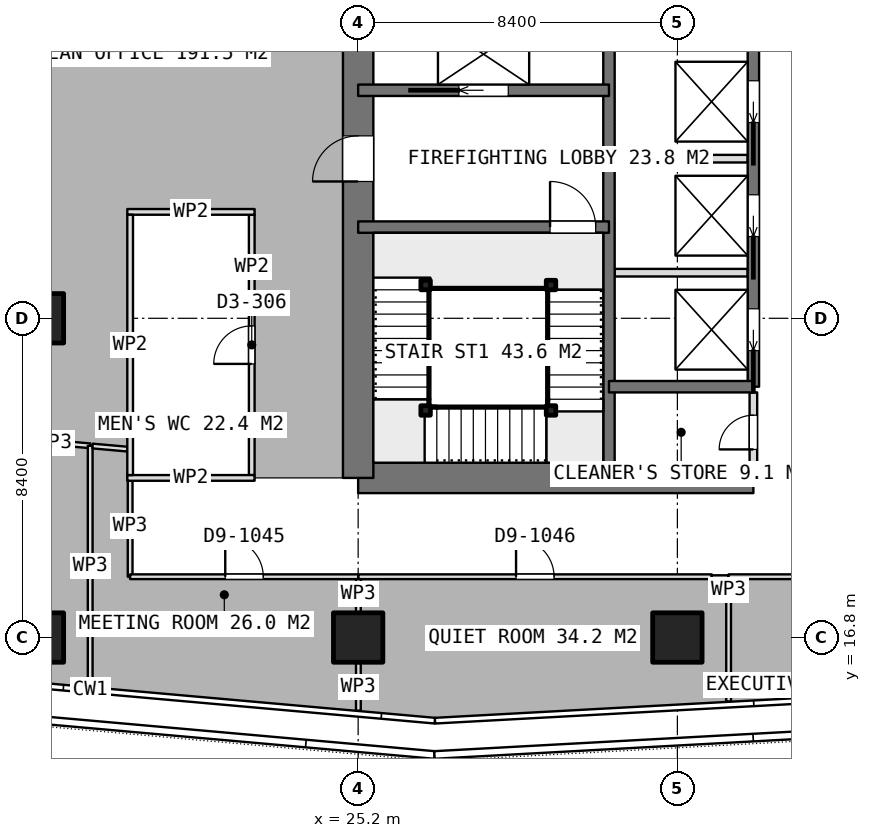
"""IFC4 building model, lengths in metres.
Left out: names, types, materials, properties, quantities, classifications, styles, units other than length and angle.
Written with IfcOpenShell. Run it as: python <this file> out.ifc"""

import sys

from ifc_helpers import new_model, si_unit, direction, frame, frame_2d, origin, origin_2d, place, context, subcontext, project, spatial, rectangle, extrude, element, fill, save


model = new_model("IFC4")
c1 = context("Model", 3, precision=1e-05, world=origin(), true_north=direction((0.0, 1.0)))
c2 = subcontext(c1, "Body", "Model", "MODEL_VIEW")
j1 = project(units=[si_unit("LENGTHUNIT", "METRE"), si_unit("PLANEANGLEUNIT", "RADIAN")], contexts=[c1])
p1 = place(None, origin())
s1 = spatial("IfcSite", under=j1, at=p1, CompositionType="ELEMENT")
p2 = place(p1, origin())
s2 = spatial("IfcBuilding", under=s1, at=p2, CompositionType="ELEMENT")
p3 = place(p2, frame((0.0, 0.0, 283.85)))
s3 = spatial("IfcBuildingStorey", under=s2, at=p3, CompositionType="ELEMENT", Elevation=283.85)
p4 = place(p3, frame((25.2, 21.0, 0.0), z_axis=(0.0, 0.0, 1.0), x_axis=(1.0, 0.0, 0.0)))
e1 = element("IfcWall", 1, at=p4, inside=s3, PredefinedType="SHEAR", context=c2, shape_type="SweptSolid", body=[
    extrude(rectangle(XDim=10.4, YDim=0.8, at=frame_2d((5.2, 0.0))), origin(), (0.0, 0.0, 1.0), 3.75),
])
p5 = place(p3, frame((25.2, 21.0, 0.0), z_axis=(0.0, 0.0, 1.0), x_axis=(0.0, 1.0, 0.0)))
e2 = element("IfcWall", 2, at=p5, inside=s3, PredefinedType="SHEAR", context=c2, shape_type="SweptSolid", body=[
    extrude(rectangle(XDim=25.2, YDim=0.8, at=frame_2d((12.6, 0.0))), origin(), (0.0, 0.0, 1.0), 3.75),
])
p6 = place(p5, frame((7.8, 0.0, 0.0)))
e3 = element("IfcOpeningElement", 3, at=p6, cuts=e2, PredefinedType="OPENING", context=c2, shape_type="SweptSolid", body=[
    extrude(rectangle(XDim=1.2, YDim=2.1, at=frame_2d((0.6, 1.05))), frame((0.0, 0.41, 0.0), z_axis=(0.0, -1.0, 0.0), x_axis=(1.0, 0.0, 0.0)), (0.0, 0.0, 1.0), 0.82),
])
p7 = place(p5, frame((14.25, 0.0, 0.0)))
e4 = element("IfcOpeningElement", 4, at=p7, cuts=e2, PredefinedType="OPENING", context=c2, shape_type="SweptSolid", body=[
    extrude(rectangle(XDim=0.9, YDim=2.1, at=frame_2d((0.45, 1.05))), frame((0.0, 0.41, 0.0), z_axis=(0.0, -1.0, 0.0), x_axis=(1.0, 0.0, 0.0)), (0.0, 0.0, 1.0), 0.82),
])
p8 = place(p5, frame((16.85, 0.0, 0.0)))
e5 = element("IfcOpeningElement", 5, at=p8, cuts=e2, PredefinedType="OPENING", context=c2, shape_type="SweptSolid", body=[
    extrude(rectangle(XDim=0.9, YDim=2.1, at=frame_2d((0.45, 1.05))), frame((0.0, 0.41, 0.0), z_axis=(0.0, -1.0, 0.0), x_axis=(1.0, 0.0, 0.0)), (0.0, 0.0, 1.0), 0.82),
])
p9 = place(p5, frame((18.95, 0.0, 0.0)))
e6 = element("IfcOpeningElement", 6, at=p9, cuts=e2, PredefinedType="OPENING", context=c2, shape_type="SweptSolid", body=[
    extrude(rectangle(XDim=1.2, YDim=2.1, at=frame_2d((0.6, 1.05))), frame((0.0, 0.41, 0.0), z_axis=(0.0, -1.0, 0.0), x_axis=(1.0, 0.0, 0.0)), (0.0, 0.0, 1.0), 0.82),
])
p10 = place(p3, frame((31.8, 21.0, 0.0), z_axis=(0.0, 0.0, 1.0), x_axis=(0.0, 1.0, 0.0)))
e7 = element("IfcWall", 7, at=p10, inside=s3, PredefinedType="SHEAR", context=c2, shape_type="SweptSolid", body=[
    extrude(rectangle(XDim=25.2, YDim=0.3, at=frame_2d((12.6, 0.0))), origin(), (0.0, 0.0, 1.0), 3.75),
])
p11 = place(p3, frame((35.6, 23.4, 0.0), z_axis=(0.0, 0.0, 1.0), x_axis=(0.0, 1.0, 0.0)))
e8 = element("IfcWall", 8, at=p11, inside=s3, PredefinedType="SHEAR", context=c2, shape_type="SweptSolid", body=[
    extrude(rectangle(XDim=18.0, YDim=0.3, at=frame_2d((9.0, 0.0))), origin(), (0.0, 0.0, 1.0), 3.75),
])
p12 = place(p11, frame((0.95, 0.0, 0.0)))
e9 = element("IfcOpeningElement", 9, at=p12, cuts=e8, PredefinedType="OPENING", context=c2, shape_type="SweptSolid", body=[
    extrude(rectangle(XDim=1.1, YDim=2.1, at=frame_2d((0.55, 1.05))), frame((0.0, 0.16, 0.0), z_axis=(0.0, -1.0, 0.0), x_axis=(1.0, 0.0, 0.0)), (0.0, 0.0, 1.0), 0.32),
])
p13 = place(p11, frame((3.95, 0.0, 0.0)))
e10 = element("IfcOpeningElement", 10, at=p13, cuts=e8, PredefinedType="OPENING", context=c2, shape_type="SweptSolid", body=[
    extrude(rectangle(XDim=1.1, YDim=2.1, at=frame_2d((0.55, 1.05))), frame((0.0, 0.16, 0.0), z_axis=(0.0, -1.0, 0.0), x_axis=(1.0, 0.0, 0.0)), (0.0, 0.0, 1.0), 0.32),
])
p14 = place(p11, frame((6.95, 0.0, 0.0)))
e11 = element("IfcOpeningElement", 11, at=p14, cuts=e8, PredefinedType="OPENING", context=c2, shape_type="SweptSolid", body=[
    extrude(rectangle(XDim=1.1, YDim=2.1, at=frame_2d((0.55, 1.05))), frame((0.0, 0.16, 0.0), z_axis=(0.0, -1.0, 0.0), x_axis=(1.0, 0.0, 0.0)), (0.0, 0.0, 1.0), 0.32),
])
p15 = place(p11, frame((9.95, 0.0, 0.0)))
e12 = element("IfcOpeningElement", 12, at=p15, cuts=e8, PredefinedType="OPENING", context=c2, shape_type="SweptSolid", body=[
    extrude(rectangle(XDim=1.1, YDim=2.1, at=frame_2d((0.55, 1.05))), frame((0.0, 0.16, 0.0), z_axis=(0.0, -1.0, 0.0), x_axis=(1.0, 0.0, 0.0)), (0.0, 0.0, 1.0), 0.32),
])
p16 = place(p11, frame((12.95, 0.0, 0.0)))
e13 = element("IfcOpeningElement", 13, at=p16, cuts=e8, PredefinedType="OPENING", context=c2, shape_type="SweptSolid", body=[
    extrude(rectangle(XDim=1.1, YDim=2.1, at=frame_2d((0.55, 1.05))), frame((0.0, 0.16, 0.0), z_axis=(0.0, -1.0, 0.0), x_axis=(1.0, 0.0, 0.0)), (0.0, 0.0, 1.0), 0.32),
])
p17 = place(p11, frame((15.95, 0.0, 0.0)))
e14 = element("IfcOpeningElement", 14, at=p17, cuts=e8, PredefinedType="OPENING", context=c2, shape_type="SweptSolid", body=[
    extrude(rectangle(XDim=1.1, YDim=2.1, at=frame_2d((0.55, 1.05))), frame((0.0, 0.16, 0.0), z_axis=(0.0, -1.0, 0.0), x_axis=(1.0, 0.0, 0.0)), (0.0, 0.0, 1.0), 0.32),
])
p18 = place(p3, frame((31.8, 23.4, 0.0), z_axis=(0.0, 0.0, 1.0), x_axis=(1.0, 0.0, 0.0)))
e15 = element("IfcWall", 15, at=p18, inside=s3, PredefinedType="SHEAR", context=c2, shape_type="SweptSolid", body=[
    extrude(rectangle(XDim=3.8, YDim=0.3, at=frame_2d((1.9, 0.0))), origin(), (0.0, 0.0, 1.0), 3.75),
])
p19 = place(p3, frame((25.2, 27.6, 0.0), z_axis=(0.0, 0.0, 1.0), x_axis=(1.0, 0.0, 0.0)))
e16 = element("IfcWall", 16, at=p19, inside=s3, PredefinedType="SHEAR", context=c2, shape_type="SweptSolid", body=[
    extrude(rectangle(XDim=6.6, YDim=0.3, at=frame_2d((3.3, 0.0))), origin(), (0.0, 0.0, 1.0), 3.75),
])
p20 = place(p19, frame((5.05, 0.0, 0.0)))
e17 = element("IfcOpeningElement", 17, at=p20, cuts=e16, PredefinedType="OPENING", context=c2, shape_type="SweptSolid", body=[
    extrude(rectangle(XDim=1.2, YDim=2.1, at=frame_2d((0.6, 1.05))), frame((0.0, 0.16, 0.0), z_axis=(0.0, -1.0, 0.0), x_axis=(1.0, 0.0, 0.0)), (0.0, 0.0, 1.0), 0.32),
])
p21 = place(p3, frame((25.2, 31.2, 0.0), z_axis=(0.0, 0.0, 1.0), x_axis=(1.0, 0.0, 0.0)))
e18 = element("IfcWall", 18, at=p21, inside=s3, PredefinedType="SHEAR", context=c2, shape_type="SweptSolid", body=[
    extrude(rectangle(XDim=6.6, YDim=0.3, at=frame_2d((3.3, 0.0))), origin(), (0.0, 0.0, 1.0), 3.75),
])
p22 = place(p21, frame((2.65, 0.0, 0.0)))
e19 = element("IfcOpeningElement", 19, at=p22, cuts=e18, PredefinedType="OPENING", context=c2, shape_type="SweptSolid", body=[
    extrude(rectangle(XDim=1.3, YDim=2.1, at=frame_2d((0.65, 1.05))), frame((0.0, 0.16, 0.0), z_axis=(0.0, -1.0, 0.0), x_axis=(1.0, 0.0, 0.0)), (0.0, 0.0, 1.0), 0.32),
])
for number, where, z_axis, x_axis in (
    (20, (16.8, 16.8, 0.0), (0.0, 0.0, 1.0), (1.0, 0.0, 0.0)),
    (21, (16.8, 25.2, 0.0), (0.0, 0.0, 1.0), (1.0, 0.0, 0.0)),
    (22, (25.2, 16.8, 0.0), (0.0, 0.0, 1.0), (1.0, 0.0, 0.0)),
    (23, (33.6, 16.8, 0.0), (0.0, 0.0, 1.0), (1.0, 0.0, 0.0)),
):
    element("IfcColumn", number, at=place(p3, frame(where, z_axis=z_axis, x_axis=x_axis)), inside=s3, PredefinedType="COLUMN", context=c2, shape_type="SweptSolid", body=[
        extrude(rectangle(XDim=1.3, YDim=1.3, at=origin_2d()), origin(), (0.0, 0.0, 1.0), 3.75),
    ])
for number, where, z_axis, x_axis in (
    (24, (31.95, 26.4, 0.0), (0.0, 0.0, 1.0), (1.0, 0.0, 0.0)),
    (25, (31.95, 29.4, 0.0), (0.0, 0.0, 1.0), (1.0, 0.0, 0.0)),
):
    element("IfcWall", number, at=place(p3, frame(where, z_axis=z_axis, x_axis=x_axis)), inside=s3, PredefinedType="PARTITIONING", context=c2, shape_type="SweptSolid", body=[
        extrude(rectangle(XDim=3.5, YDim=0.2, at=frame_2d((1.75, 0.0))), origin(), (0.0, 0.0, 1.0), 3.5),
    ])
p23 = place(p3, frame((35.6, 21.4, 0.0), z_axis=(0.0, 0.0, 1.0), x_axis=(0.0, 1.0, 0.0)))
e26 = element("IfcWall", 26, at=p23, inside=s3, PredefinedType="PARTITIONING", context=c2, shape_type="SweptSolid", body=[
    extrude(rectangle(XDim=1.85, YDim=0.2, at=frame_2d((0.925, 0.0))), origin(), (0.0, 0.0, 1.0), 3.5),
])
p24 = place(p23, frame((0.35, 0.0, 0.0)))
e27 = element("IfcOpeningElement", 27, at=p24, cuts=e26, PredefinedType="OPENING", context=c2, shape_type="SweptSolid", body=[
    extrude(rectangle(XDim=0.9, YDim=2.1, at=frame_2d((0.45, 1.05))), frame((0.0, 0.11, 0.0), z_axis=(0.0, -1.0, 0.0), x_axis=(1.0, 0.0, 0.0)), (0.0, 0.0, 1.0), 0.22),
])
for number, where, z_axis, x_axis in (
    (28, (19.125, 21.0, 0.0), (0.0, 0.0, 1.0), (1.0, 0.0, 0.0)),
    (29, (19.125, 28.0, 0.0), (0.0, 0.0, 1.0), (1.0, 0.0, 0.0)),
):
    element("IfcWall", number, at=place(p3, frame(where, z_axis=z_axis, x_axis=x_axis)), inside=s3, PredefinedType="PARTITIONING", context=c2, shape_type="SweptSolid", body=[
        extrude(rectangle(XDim=3.35, YDim=0.15, at=frame_2d((1.675, 0.0))), origin(), (0.0, 0.0, 1.0), 3.5),
    ])
p25 = place(p3, frame((19.2, 21.075, 0.0), z_axis=(0.0, 0.0, 1.0), x_axis=(0.0, 1.0, 0.0)))
e30 = element("IfcWall", 30, at=p25, inside=s3, PredefinedType="PARTITIONING", context=c2, shape_type="SweptSolid", body=[
    extrude(rectangle(XDim=6.85, YDim=0.15, at=frame_2d((3.425, 0.0))), origin(), (0.0, 0.0, 1.0), 3.5),
])
p26 = place(p3, frame((22.4, 21.075, 0.0), z_axis=(0.0, 0.0, 1.0), x_axis=(0.0, 1.0, 0.0)))
e31 = element("IfcWall", 31, at=p26, inside=s3, PredefinedType="PARTITIONING", context=c2, shape_type="SweptSolid", body=[
    extrude(rectangle(XDim=6.85, YDim=0.15, at=frame_2d((3.425, 0.0))), origin(), (0.0, 0.0, 1.0), 3.5),
])
p27 = place(p26, frame((2.925, 0.0, 0.0)))
e32 = element("IfcOpeningElement", 32, at=p27, cuts=e31, PredefinedType="OPENING", context=c2, shape_type="SweptSolid", body=[
    extrude(rectangle(XDim=1.0, YDim=2.1, at=frame_2d((0.5, 1.05))), frame((0.0, 0.085, 0.0), z_axis=(0.0, -1.0, 0.0), x_axis=(1.0, 0.0, 0.0)), (0.0, 0.0, 1.0), 0.17),
])
p28 = place(p3, frame((13.488, 22.259, 0.0), z_axis=(0.0, 0.0, 1.0), x_axis=(0.996077138593, -0.088489174326, 0.0)))
e33 = element("IfcWall", 33, at=p28, inside=s3, PredefinedType="PARTITIONING", context=c2, shape_type="SweptSolid", body=[
    extrude(rectangle(XDim=4.679, YDim=0.125, at=frame_2d((2.34, 0.0))), origin(), (0.0, 0.0, 1.0), 3.5),
])
p29 = place(p28, frame((1.035, 0.0, 0.0)))
e34 = element("IfcOpeningElement", 34, at=p29, cuts=e33, PredefinedType="OPENING", context=c2, shape_type="SweptSolid", body=[
    extrude(rectangle(XDim=1.8, YDim=2.1, at=frame_2d((0.9, 1.05))), frame((0.0, 0.073, 0.0), z_axis=(0.0, -1.0, 0.0), x_axis=(1.0, 0.0, 0.0)), (0.0, 0.0, 1.0), 0.145),
])
p30 = place(p3, frame((18.149, 21.845, 0.0), z_axis=(0.0, 0.0, 1.0), x_axis=(0.0, -1.0, 0.0)))
e35 = element("IfcWall", 35, at=p30, inside=s3, PredefinedType="PARTITIONING", context=c2, shape_type="SweptSolid", body=[
    extrude(rectangle(XDim=6.345, YDim=0.125, at=frame_2d((3.172, 0.0))), origin(), (0.0, 0.0, 1.0), 3.5),
])
p31 = place(p3, frame((25.206, 18.4, 0.0), z_axis=(0.0, 0.0, 1.0), x_axis=(0.0, -1.0, 0.0)))
e36 = element("IfcWall", 36, at=p31, inside=s3, PredefinedType="PARTITIONING", context=c2, shape_type="SweptSolid", body=[
    extrude(rectangle(XDim=0.93, YDim=0.125, at=frame_2d((0.465, 0.0))), origin(), (0.0, 0.0, 1.0), 3.5),
])
p32 = place(p3, frame((25.206, 16.13, 0.0), z_axis=(0.0, 0.0, 1.0), x_axis=(0.0, -1.0, 0.0)))
e37 = element("IfcWall", 37, at=p32, inside=s3, PredefinedType="PARTITIONING", context=c2, shape_type="SweptSolid", body=[
    extrude(rectangle(XDim=1.258, YDim=0.125, at=frame_2d((0.629, 0.0))), origin(), (0.0, 0.0, 1.0), 3.5),
])
p33 = place(p3, frame((18.212, 21.839, 0.0), z_axis=(0.0, 0.0, 1.0), x_axis=(0.996083073059, -0.088422347662, 0.0)))
e38 = element("IfcWall", 38, at=p33, inside=s3, PredefinedType="PARTITIONING", context=c2, shape_type="SweptSolid", body=[
    extrude(rectangle(XDim=0.917, YDim=0.125, at=frame_2d((0.458, 0.0))), origin(), (0.0, 0.0, 1.0), 3.5),
])
p34 = place(p3, frame((19.2, 21.075, 0.0), z_axis=(0.0, 0.0, 1.0), x_axis=(0.0, -1.0, 0.0)))
e39 = element("IfcWall", 39, at=p34, inside=s3, PredefinedType="PARTITIONING", context=c2, shape_type="SweptSolid", body=[
    extrude(rectangle(XDim=2.675, YDim=0.125, at=frame_2d((1.337, 0.0))), origin(), (0.0, 0.0, 1.0), 3.5),
])
p35 = place(p3, frame((19.2, 18.4, 0.0), z_axis=(0.0, 0.0, 1.0), x_axis=(1.0, 0.0, 0.0)))
e40 = element("IfcWall", 40, at=p35, inside=s3, PredefinedType="PARTITIONING", context=c2, shape_type="SweptSolid", body=[
    extrude(rectangle(XDim=6.006, YDim=0.125, at=frame_2d((3.003, 0.0))), origin(), (0.0, 0.0, 1.0), 3.5),
])
p36 = place(p35, frame((2.503, 0.0, 0.0)))
e41 = element("IfcOpeningElement", 41, at=p36, cuts=e40, PredefinedType="OPENING", context=c2, shape_type="SweptSolid", body=[
    extrude(rectangle(XDim=1.0, YDim=2.1, at=frame_2d((0.5, 1.05))), frame((0.0, 0.073, 0.0), z_axis=(0.0, -1.0, 0.0), x_axis=(1.0, 0.0, 0.0)), (0.0, 0.0, 1.0), 0.145),
])
p37 = place(p3, frame((34.948, 18.375, 0.0), z_axis=(0.0, 0.0, 1.0), x_axis=(0.0, -1.0, 0.0)))
e42 = element("IfcWall", 42, at=p37, inside=s3, PredefinedType="PARTITIONING", context=c2, shape_type="SweptSolid", body=[
    extrude(rectangle(XDim=3.261, YDim=0.125, at=frame_2d((1.63, 0.0))), origin(), (0.0, 0.0, 1.0), 3.5),
])
p38 = place(p3, frame((25.207, 18.4, 0.0), z_axis=(0.0, 0.0, 1.0), x_axis=(1.0, 0.0, 0.0)))
e43 = element("IfcWall", 43, at=p38, inside=s3, PredefinedType="PARTITIONING", context=c2, shape_type="SweptSolid", body=[
    extrude(rectangle(XDim=9.297, YDim=0.125, at=frame_2d((4.648, 0.0))), origin(), (0.0, 0.0, 1.0), 3.5),
])
p39 = place(p38, frame((4.148, 0.0, 0.0)))
e44 = element("IfcOpeningElement", 44, at=p39, cuts=e43, PredefinedType="OPENING", context=c2, shape_type="SweptSolid", body=[
    extrude(rectangle(XDim=1.0, YDim=2.1, at=frame_2d((0.5, 1.05))), frame((0.0, 0.073, 0.0), z_axis=(0.0, -1.0, 0.0), x_axis=(1.0, 0.0, 0.0)), (0.0, 0.0, 1.0), 0.145),
])
p40 = place(p3, frame((34.504, 18.375, 0.0), z_axis=(0.0, 0.0, 1.0), x_axis=(1.0, 0.0, 0.0)))
e45 = element("IfcWall", 45, at=p40, inside=s3, PredefinedType="PARTITIONING", context=c2, shape_type="SweptSolid", body=[
    extrude(rectangle(XDim=0.444, YDim=0.125, at=frame_2d((0.222, 0.0))), origin(), (0.0, 0.0, 1.0), 3.5),
])
p41 = place(p3, frame((34.948, 18.4, 0.0), z_axis=(0.0, 0.0, 1.0), x_axis=(1.0, 0.0, 0.0)))
e46 = element("IfcWall", 46, at=p41, inside=s3, PredefinedType="PARTITIONING", context=c2, shape_type="SweptSolid", body=[
    extrude(rectangle(XDim=7.726, YDim=0.125, at=frame_2d((3.863, 0.0))), origin(), (0.0, 0.0, 1.0), 3.5),
])
p42 = place(p41, frame((3.363, 0.0, 0.0)))
e47 = element("IfcOpeningElement", 47, at=p42, cuts=e46, PredefinedType="OPENING", context=c2, shape_type="SweptSolid", body=[
    extrude(rectangle(XDim=1.0, YDim=2.1, at=frame_2d((0.5, 1.05))), frame((0.0, 0.073, 0.0), z_axis=(0.0, -1.0, 0.0), x_axis=(1.0, 0.0, 0.0)), (0.0, 0.0, 1.0), 0.145),
])
for number, where, z_axis, x_axis in (
    (48, (30.275, 26.075, 0.0), (0.0, 0.0, 1.0), (1.0, 0.0, 0.0)),
    (49, (30.275, 22.775, 0.0), (0.0, 0.0, 1.0), (1.0, 0.0, 0.0)),
    (50, (26.975, 22.775, 0.0), (0.0, 0.0, 1.0), (1.0, 0.0, 0.0)),
    (51, (26.975, 26.075, 0.0), (0.0, 0.0, 1.0), (1.0, 0.0, 0.0)),
):
    element("IfcColumn", number, at=place(p3, frame(where, z_axis=z_axis, x_axis=x_axis)), inside=s3, PredefinedType="COLUMN", context=c2, shape_type="SweptSolid", body=[
        extrude(rectangle(XDim=0.25, YDim=0.25, at=origin_2d()), origin(), (0.0, 0.0, 1.0), 3.75),
    ])
p43 = place(p6, origin())
e52 = element("IfcDoor", 52, at=p43, inside=s3, OperationType="SINGLE_SWING_LEFT", PredefinedType="DOOR", context=c2, shape_type="SweptSolid", body=[
    extrude(rectangle(XDim=1.2, YDim=2.1, at=frame_2d((0.6, 1.05))), frame((0.0, 0.025, 0.0), z_axis=(0.0, -1.0, 0.0), x_axis=(1.0, 0.0, 0.0)), (0.0, 0.0, 1.0), 0.05),
])
fill(e3, e52)
p44 = place(p24, origin())
e53 = element("IfcDoor", 53, at=p44, inside=s3, OperationType="SINGLE_SWING_LEFT", PredefinedType="DOOR", context=c2, shape_type="SweptSolid", body=[
    extrude(rectangle(XDim=0.9, YDim=2.1, at=frame_2d((0.45, 1.05))), frame((0.0, 0.025, 0.0), z_axis=(0.0, -1.0, 0.0), x_axis=(1.0, 0.0, 0.0)), (0.0, 0.0, 1.0), 0.05),
])
fill(e27, e53)
p45 = place(p12, origin())
e54 = element("IfcDoor", 54, at=p45, inside=s3, OperationType="SLIDING_TO_LEFT", PredefinedType="USERDEFINED", context=c2, shape_type="SweptSolid", body=[
    extrude(rectangle(XDim=1.1, YDim=2.1, at=frame_2d((0.55, 1.05))), frame((0.0, 0.025, 0.0), z_axis=(0.0, -1.0, 0.0), x_axis=(1.0, 0.0, 0.0)), (0.0, 0.0, 1.0), 0.05),
])
fill(e9, e54)
p46 = place(p13, origin())
e55 = element("IfcDoor", 55, at=p46, inside=s3, OperationType="SLIDING_TO_LEFT", PredefinedType="USERDEFINED", context=c2, shape_type="SweptSolid", body=[
    extrude(rectangle(XDim=1.1, YDim=2.1, at=frame_2d((0.55, 1.05))), frame((0.0, 0.025, 0.0), z_axis=(0.0, -1.0, 0.0), x_axis=(1.0, 0.0, 0.0)), (0.0, 0.0, 1.0), 0.05),
])
fill(e10, e55)
p47 = place(p14, origin())
e56 = element("IfcDoor", 56, at=p47, inside=s3, OperationType="SLIDING_TO_LEFT", PredefinedType="USERDEFINED", context=c2, shape_type="SweptSolid", body=[
    extrude(rectangle(XDim=1.1, YDim=2.1, at=frame_2d((0.55, 1.05))), frame((0.0, 0.025, 0.0), z_axis=(0.0, -1.0, 0.0), x_axis=(1.0, 0.0, 0.0)), (0.0, 0.0, 1.0), 0.05),
])
fill(e11, e56)
p48 = place(p22, origin())
e57 = element("IfcDoor", 57, at=p48, inside=s3, OperationType="SLIDING_TO_LEFT", PredefinedType="USERDEFINED", context=c2, shape_type="SweptSolid", body=[
    extrude(rectangle(XDim=1.3, YDim=2.1, at=frame_2d((0.65, 1.05))), frame((0.0, 0.025, 0.0), z_axis=(0.0, -1.0, 0.0), x_axis=(1.0, 0.0, 0.0)), (0.0, 0.0, 1.0), 0.05),
])
fill(e19, e57)
p49 = place(p27, origin())
e58 = element("IfcDoor", 58, at=p49, inside=s3, OperationType="SINGLE_SWING_LEFT", PredefinedType="DOOR", context=c2, shape_type="SweptSolid", body=[
    extrude(rectangle(XDim=1.0, YDim=2.1, at=frame_2d((0.5, 1.05))), frame((0.0, 0.025, 0.0), z_axis=(0.0, -1.0, 0.0), x_axis=(1.0, 0.0, 0.0)), (0.0, 0.0, 1.0), 0.05),
])
fill(e32, e58)
p50 = place(p36, origin())
e59 = element("IfcDoor", 59, at=p50, inside=s3, OperationType="SINGLE_SWING_LEFT", PredefinedType="DOOR", context=c2, shape_type="SweptSolid", body=[
    extrude(rectangle(XDim=1.0, YDim=2.1, at=frame_2d((0.5, 1.05))), frame((0.0, 0.025, 0.0), z_axis=(0.0, -1.0, 0.0), x_axis=(1.0, 0.0, 0.0)), (0.0, 0.0, 1.0), 0.05),
])
fill(e41, e59)
p51 = place(p39, origin())
e60 = element("IfcDoor", 60, at=p51, inside=s3, OperationType="SINGLE_SWING_LEFT", PredefinedType="DOOR", context=c2, shape_type="SweptSolid", body=[
    extrude(rectangle(XDim=1.0, YDim=2.1, at=frame_2d((0.5, 1.05))), frame((0.0, 0.025, 0.0), z_axis=(0.0, -1.0, 0.0), x_axis=(1.0, 0.0, 0.0)), (0.0, 0.0, 1.0), 0.05),
])
fill(e44, e60)
p52 = place(p20, origin())
e61 = element("IfcDoor", 61, at=p52, inside=s3, OperationType="SINGLE_SWING_RIGHT", PredefinedType="DOOR", context=c2, shape_type="SweptSolid", body=[
    extrude(rectangle(XDim=1.2, YDim=2.1, at=frame_2d((0.6, 1.05))), frame((0.0, 0.025, 0.0), z_axis=(0.0, -1.0, 0.0), x_axis=(1.0, 0.0, 0.0)), (0.0, 0.0, 1.0), 0.05),
])
fill(e17, e61)
save(model, sys.argv[1])
